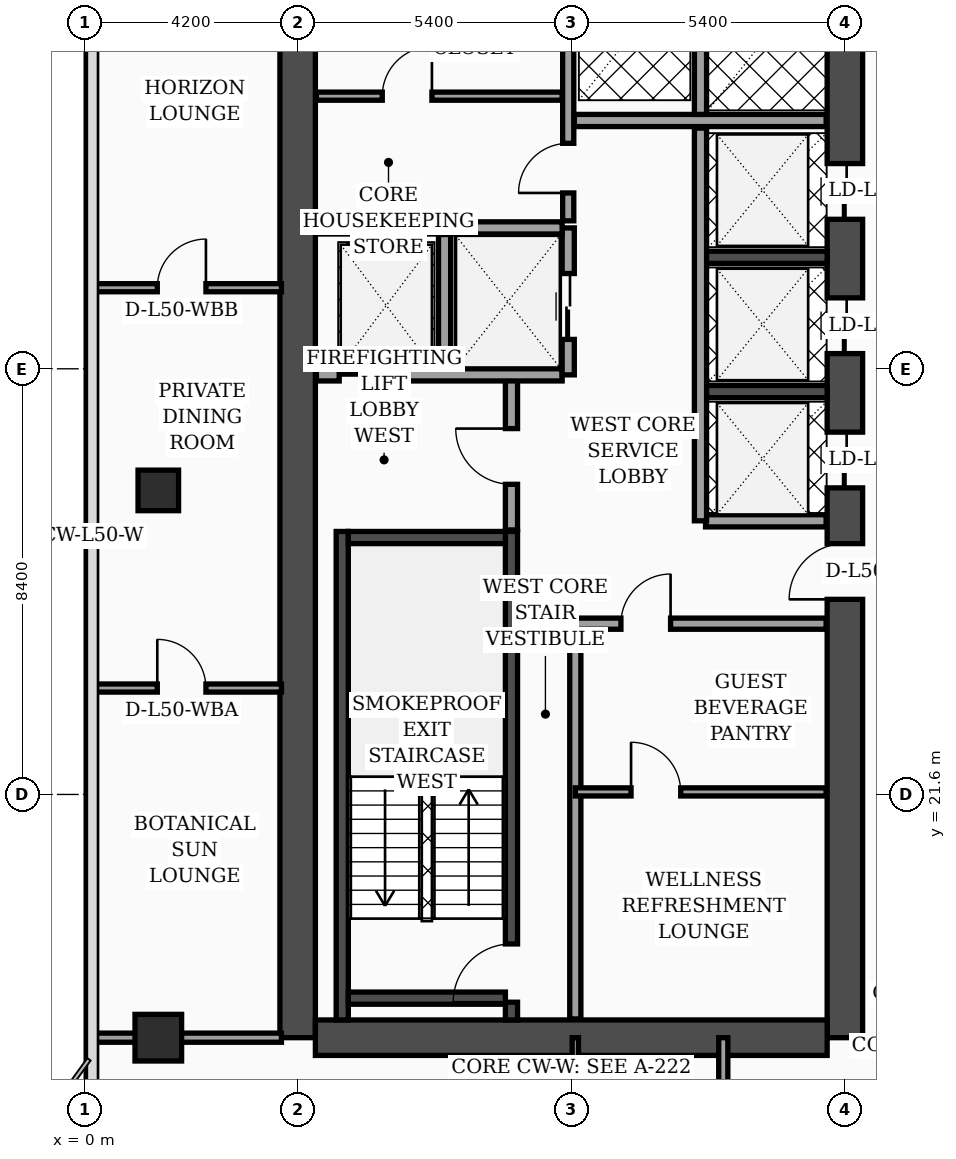
"""IFC4 building model, lengths in metres.
Left out: names, types, materials, properties, quantities, classifications, styles, units other than length and angle.
Written with IfcOpenShell. Run it as: python <this file> out.ifc"""

import sys

from ifc_helpers import new_model, si_unit, direction, frame, frame_2d, origin, origin_2d, place, context, subcontext, project, spatial, rectangle, extrude, element, fill, save


model = new_model("IFC4")
c1 = context("Model", 3, precision=1e-05, world=origin(), true_north=direction((0.0, 1.0)))
c2 = subcontext(c1, "Body", "Model", "MODEL_VIEW")
j1 = project(units=[si_unit("LENGTHUNIT", "METRE"), si_unit("PLANEANGLEUNIT", "RADIAN")], contexts=[c1])
p1 = place(None, origin())
s1 = spatial("IfcSite", under=j1, at=p1, CompositionType="ELEMENT")
p2 = place(p1, origin())
s2 = spatial("IfcBuilding", under=s1, at=p2, CompositionType="ELEMENT")
p3 = place(p2, frame((0.0, 0.0, 203.4)))
s3 = spatial("IfcBuildingStorey", under=s2, at=p3, CompositionType="ELEMENT", Elevation=203.4)
p4 = place(p3, frame((4.2, 16.8, 0.0), z_axis=(0.0, 0.0, 1.0), x_axis=(0.0, 1.0, 0.0)))
e1 = element("IfcWall", 1, at=p4, inside=s3, PredefinedType="SHEAR", context=c2, shape_type="SweptSolid", body=[
    extrude(rectangle(XDim=21.6, YDim=0.7, at=frame_2d((10.8, 0.0))), origin(), (0.0, 0.0, 1.0), 3.56),
])
p5 = place(p3, frame((15.0, 16.8, 0.0), z_axis=(0.0, 0.0, 1.0), x_axis=(0.0, 1.0, 0.0)))
e2 = element("IfcWall", 2, at=p5, inside=s3, PredefinedType="SHEAR", context=c2, shape_type="SweptSolid", body=[
    extrude(rectangle(XDim=21.6, YDim=0.7, at=frame_2d((10.8, 0.0))), origin(), (0.0, 0.0, 1.0), 3.56),
])
p6 = place(p5, frame((8.65, 0.0, 0.0)))
e3 = element("IfcOpeningElement", 3, at=p6, cuts=e2, PredefinedType="OPENING", context=c2, shape_type="SweptSolid", body=[
    extrude(rectangle(XDim=1.1, YDim=2.2, at=frame_2d((0.55, 1.1))), frame((0.0, 0.36, 0.0), z_axis=(0.0, -1.0, 0.0), x_axis=(1.0, 0.0, 0.0)), (0.0, 0.0, 1.0), 0.72),
])
p7 = place(p5, frame((10.85, 0.0, 0.0)))
e4 = element("IfcOpeningElement", 4, at=p7, cuts=e2, PredefinedType="OPENING", context=c2, shape_type="SweptSolid", body=[
    extrude(rectangle(XDim=1.1, YDim=2.2, at=frame_2d((0.55, 1.1))), frame((0.0, 0.36, 0.0), z_axis=(0.0, -1.0, 0.0), x_axis=(1.0, 0.0, 0.0)), (0.0, 0.0, 1.0), 0.72),
])
p8 = place(p5, frame((13.5, 0.0, 0.0)))
e5 = element("IfcOpeningElement", 5, at=p8, cuts=e2, PredefinedType="OPENING", context=c2, shape_type="SweptSolid", body=[
    extrude(rectangle(XDim=1.1, YDim=2.2, at=frame_2d((0.55, 1.1))), frame((0.0, 0.36, 0.0), z_axis=(0.0, -1.0, 0.0), x_axis=(1.0, 0.0, 0.0)), (0.0, 0.0, 1.0), 0.72),
])
p9 = place(p5, frame((16.15, 0.0, 0.0)))
e6 = element("IfcOpeningElement", 6, at=p9, cuts=e2, PredefinedType="OPENING", context=c2, shape_type="SweptSolid", body=[
    extrude(rectangle(XDim=1.1, YDim=2.2, at=frame_2d((0.55, 1.1))), frame((0.0, 0.36, 0.0), z_axis=(0.0, -1.0, 0.0), x_axis=(1.0, 0.0, 0.0)), (0.0, 0.0, 1.0), 0.72),
])
p10 = place(p3, frame((4.55, 16.8, 0.0), z_axis=(0.0, 0.0, 1.0), x_axis=(1.0, 0.0, 0.0)))
e7 = element("IfcWall", 7, at=p10, inside=s3, PredefinedType="SHEAR", context=c2, shape_type="SweptSolid", body=[
    extrude(rectangle(XDim=10.1, YDim=0.7, at=frame_2d((5.05, 0.0))), origin(), (0.0, 0.0, 1.0), 3.56),
])
p11 = place(p3, frame((5.08, 17.15, 0.0), z_axis=(0.0, 0.0, 1.0), x_axis=(0.0, 1.0, 0.0)))
e8 = element("IfcWall", 8, at=p11, inside=s3, PredefinedType="SOLIDWALL", context=c2, shape_type="SweptSolid", body=[
    extrude(rectangle(XDim=9.64, YDim=0.24, at=frame_2d((4.82, 0.0))), origin(), (0.0, 0.0, 1.0), 3.56),
])
p12 = place(p3, frame((8.42, 17.15, 0.0), z_axis=(0.0, 0.0, 1.0), x_axis=(0.0, 1.0, 0.0)))
e9 = element("IfcWall", 9, at=p12, inside=s3, PredefinedType="SOLIDWALL", context=c2, shape_type="SweptSolid", body=[
    extrude(rectangle(XDim=9.64, YDim=0.24, at=frame_2d((4.82, 0.0))), origin(), (0.0, 0.0, 1.0), 3.56),
])
p13 = place(p12, frame((0.35, 0.0, 0.0)))
e10 = element("IfcOpeningElement", 10, at=p13, cuts=e9, PredefinedType="OPENING", context=c2, shape_type="SweptSolid", body=[
    extrude(rectangle(XDim=1.15, YDim=2.2, at=frame_2d((0.575, 1.1))), frame((0.0, 0.13, 0.0), z_axis=(0.0, -1.0, 0.0), x_axis=(1.0, 0.0, 0.0)), (0.0, 0.0, 1.0), 0.26),
])
for number, where, z_axis, x_axis in (
    (11, (5.2, 17.58, 0.0), (0.0, 0.0, 1.0), (1.0, 0.0, 0.0)),
    (12, (5.2, 26.67, 0.0), (0.0, 0.0, 1.0), (1.0, 0.0, 0.0)),
):
    element("IfcWall", number, at=place(p3, frame(where, z_axis=z_axis, x_axis=x_axis)), inside=s3, PredefinedType="SOLIDWALL", context=c2, shape_type="SweptSolid", body=[
        extrude(rectangle(XDim=3.1, YDim=0.24, at=frame_2d((1.55, 0.0))), origin(), (0.0, 0.0, 1.0), 3.56),
    ])
for number, where, z_axis, x_axis in (
    (13, (12.18, 29.55, 0.0), (0.0, 0.0, 1.0), (1.0, 0.0, 0.0)),
    (14, (12.18, 32.2, 0.0), (0.0, 0.0, 1.0), (1.0, 0.0, 0.0)),
):
    element("IfcWall", number, at=place(p3, frame(where, z_axis=z_axis, x_axis=x_axis)), inside=s3, PredefinedType="SOLIDWALL", context=c2, shape_type="SweptSolid", body=[
        extrude(rectangle(XDim=2.47, YDim=0.24, at=frame_2d((1.235, 0.0))), origin(), (0.0, 0.0, 1.0), 3.56),
    ])
p14 = place(p3, frame((1.45, 16.8, 0.0), z_axis=(0.0, 0.0, 1.0), x_axis=(1.0, 0.0, 0.0)))
e15 = element("IfcColumn", 15, at=p14, inside=s3, PredefinedType="COLUMN", context=c2, shape_type="SweptSolid", body=[
    extrude(rectangle(XDim=0.92, YDim=0.92, at=origin_2d()), origin(), (0.0, 0.0, 1.0), 3.56),
])
p15 = place(p3, frame((1.45, 27.6, 0.0), z_axis=(0.0, 0.0, 1.0), x_axis=(1.0, 0.0, 0.0)))
e16 = element("IfcColumn", 16, at=p15, inside=s3, PredefinedType="COLUMN", context=c2, shape_type="SweptSolid", body=[
    extrude(rectangle(XDim=0.8, YDim=0.8, at=origin_2d()), origin(), (0.0, 0.0, 1.0), 3.56),
])
p16 = place(p3, frame((8.42, 26.82, 0.0), z_axis=(0.0, 0.0, 1.0), x_axis=(0.0, 1.0, 0.0)))
e17 = element("IfcWall", 17, at=p16, inside=s3, PredefinedType="SOLIDWALL", context=c2, shape_type="SweptSolid", body=[
    extrude(rectangle(XDim=3.0, YDim=0.24, at=frame_2d((1.5, 0.0))), origin(), (0.0, 0.0, 1.0), 3.56),
])
p17 = place(p16, frame((0.9, 0.0, 0.0)))
e18 = element("IfcOpeningElement", 18, at=p17, cuts=e17, PredefinedType="OPENING", context=c2, shape_type="SweptSolid", body=[
    extrude(rectangle(XDim=1.1, YDim=2.2, at=frame_2d((0.55, 1.1))), frame((0.0, 0.13, 0.0), z_axis=(0.0, -1.0, 0.0), x_axis=(1.0, 0.0, 0.0)), (0.0, 0.0, 1.0), 0.26),
])
p18 = place(p3, frame((4.57, 29.88, 0.0), z_axis=(0.0, 0.0, 1.0), x_axis=(1.0, 0.0, 0.0)))
e19 = element("IfcWall", 19, at=p18, inside=s3, PredefinedType="SOLIDWALL", context=c2, shape_type="SweptSolid", body=[
    extrude(rectangle(XDim=4.85, YDim=0.24, at=frame_2d((2.425, 0.0))), origin(), (0.0, 0.0, 1.0), 3.56),
])
p19 = place(p18, frame((0.45, 0.0, 0.0)))
e20 = element("IfcOpeningElement", 20, at=p19, cuts=e19, PredefinedType="OPENING", context=c2, shape_type="SweptSolid", body=[
    extrude(rectangle(XDim=1.3, YDim=2.35, at=frame_2d((0.65, 1.175))), frame((0.0, 0.13, 0.0), z_axis=(0.0, -1.0, 0.0), x_axis=(1.0, 0.0, 0.0)), (0.0, 0.0, 1.0), 0.26),
])
p20 = place(p3, frame((7.1, 30.02, 0.0), z_axis=(0.0, 0.0, 1.0), x_axis=(0.0, 1.0, 0.0)))
e21 = element("IfcWall", 21, at=p20, inside=s3, PredefinedType="SOLIDWALL", context=c2, shape_type="SweptSolid", body=[
    extrude(rectangle(XDim=2.63, YDim=0.24, at=frame_2d((1.315, 0.0))), origin(), (0.0, 0.0, 1.0), 3.56),
])
p21 = place(p3, frame((9.54, 29.88, 0.0), z_axis=(0.0, 0.0, 1.0), x_axis=(0.0, 1.0, 0.0)))
e22 = element("IfcWall", 22, at=p21, inside=s3, PredefinedType="SOLIDWALL", context=c2, shape_type="SweptSolid", body=[
    extrude(rectangle(XDim=2.9, YDim=0.24, at=frame_2d((1.45, 0.0))), origin(), (0.0, 0.0, 1.0), 3.56),
])
p22 = place(p21, frame((0.7, 0.0, 0.0)))
e23 = element("IfcOpeningElement", 23, at=p22, cuts=e22, PredefinedType="OPENING", context=c2, shape_type="SweptSolid", body=[
    extrude(rectangle(XDim=1.3, YDim=2.35, at=frame_2d((0.65, 1.175))), frame((0.0, 0.13, 0.0), z_axis=(0.0, -1.0, 0.0), x_axis=(1.0, 0.0, 0.0)), (0.0, 0.0, 1.0), 0.26),
])
p23 = place(p3, frame((4.57, 32.78, 0.0), z_axis=(0.0, 0.0, 1.0), x_axis=(1.0, 0.0, 0.0)))
e24 = element("IfcWall", 24, at=p23, inside=s3, PredefinedType="SOLIDWALL", context=c2, shape_type="SweptSolid", body=[
    extrude(rectangle(XDim=4.85, YDim=0.24, at=frame_2d((2.425, 0.0))), origin(), (0.0, 0.0, 1.0), 3.19),
])
p24 = place(p3, frame((9.68, 17.17, 0.0), z_axis=(0.0, 0.0, 1.0), x_axis=(0.0, 1.0, 0.0)))
e25 = element("IfcWall", 25, at=p24, inside=s3, PredefinedType="SOLIDWALL", context=c2, shape_type="SweptSolid", body=[
    extrude(rectangle(XDim=7.83, YDim=0.22, at=frame_2d((3.915, 0.0))), origin(), (0.0, 0.0, 1.0), 3.56),
])
p25 = place(p3, frame((4.57, 35.38, 0.0), z_axis=(0.0, 0.0, 1.0), x_axis=(1.0, 0.0, 0.0)))
e26 = element("IfcWall", 26, at=p25, inside=s3, PredefinedType="PARTITIONING", context=c2, shape_type="SweptSolid", body=[
    extrude(rectangle(XDim=4.85, YDim=0.16, at=frame_2d((2.425, 0.0))), origin(), (0.0, 0.0, 1.0), 3.56),
])
p26 = place(p25, frame((1.3, 0.0, 0.0)))
e27 = element("IfcOpeningElement", 27, at=p26, cuts=e26, PredefinedType="OPENING", context=c2, shape_type="SweptSolid", body=[
    extrude(rectangle(XDim=0.98, YDim=2.15, at=frame_2d((0.49, 1.075))), frame((0.0, 0.09, 0.0), z_axis=(0.0, -1.0, 0.0), x_axis=(1.0, 0.0, 0.0)), (0.0, 0.0, 1.0), 0.18),
])
p27 = place(p3, frame((9.54, 32.92, 0.0), z_axis=(0.0, 0.0, 1.0), x_axis=(0.0, 1.0, 0.0)))
e28 = element("IfcWall", 28, at=p27, inside=s3, PredefinedType="SOLIDWALL", context=c2, shape_type="SweptSolid", body=[
    extrude(rectangle(XDim=5.11, YDim=0.22, at=frame_2d((2.555, 0.0))), origin(), (0.0, 0.0, 1.0), 3.56),
])
p28 = place(p27, frame((0.55, 0.0, 0.0)))
e29 = element("IfcOpeningElement", 29, at=p28, cuts=e28, PredefinedType="OPENING", context=c2, shape_type="SweptSolid", body=[
    extrude(rectangle(XDim=0.98, YDim=2.15, at=frame_2d((0.49, 1.075))), frame((0.0, 0.12, 0.0), z_axis=(0.0, -1.0, 0.0), x_axis=(1.0, 0.0, 0.0)), (0.0, 0.0, 1.0), 0.24),
])
p29 = place(p3, frame((9.68, 21.65, 0.0), z_axis=(0.0, 0.0, 1.0), x_axis=(1.0, 0.0, 0.0)))
e30 = element("IfcWall", 30, at=p29, inside=s3, PredefinedType="PARTITIONING", context=c2, shape_type="SweptSolid", body=[
    extrude(rectangle(XDim=4.95, YDim=0.16, at=frame_2d((2.475, 0.0))), origin(), (0.0, 0.0, 1.0), 3.09),
])
p30 = place(p29, frame((1.1, 0.0, 0.0)))
e31 = element("IfcOpeningElement", 31, at=p30, cuts=e30, PredefinedType="OPENING", context=c2, shape_type="SweptSolid", body=[
    extrude(rectangle(XDim=0.98, YDim=2.15, at=frame_2d((0.49, 1.075))), frame((0.0, 0.09, 0.0), z_axis=(0.0, -1.0, 0.0), x_axis=(1.0, 0.0, 0.0)), (0.0, 0.0, 1.0), 0.18),
])
p31 = place(p3, frame((9.68, 24.97, 0.0), z_axis=(0.0, 0.0, 1.0), x_axis=(1.0, 0.0, 0.0)))
e32 = element("IfcWall", 32, at=p31, inside=s3, PredefinedType="SOLIDWALL", context=c2, shape_type="SweptSolid", body=[
    extrude(rectangle(XDim=4.95, YDim=0.22, at=frame_2d((2.475, 0.0))), origin(), (0.0, 0.0, 1.0), 2.94),
])
p32 = place(p31, frame((0.9, 0.0, 0.0)))
e33 = element("IfcOpeningElement", 33, at=p32, cuts=e32, PredefinedType="OPENING", context=c2, shape_type="SweptSolid", body=[
    extrude(rectangle(XDim=0.98, YDim=2.15, at=frame_2d((0.49, 1.075))), frame((0.0, 0.12, 0.0), z_axis=(0.0, -1.0, 0.0), x_axis=(1.0, 0.0, 0.0)), (0.0, 0.0, 1.0), 0.24),
])
p33 = place(p3, frame((12.25, 27.0, 0.0), z_axis=(0.0, 0.0, 1.0), x_axis=(1.0, 0.0, 0.0)))
e34 = element("IfcWall", 34, at=p33, inside=s3, PredefinedType="SOLIDWALL", context=c2, shape_type="SweptSolid", body=[
    extrude(rectangle(XDim=2.38, YDim=0.24, at=frame_2d((1.19, 0.0))), origin(), (0.0, 0.0, 1.0), 3.56),
])
p34 = place(p3, frame((12.15, 27.0, 0.0), z_axis=(0.0, 0.0, 1.0), x_axis=(0.0, 1.0, 0.0)))
e35 = element("IfcWall", 35, at=p34, inside=s3, PredefinedType="SOLIDWALL", context=c2, shape_type="SweptSolid", body=[
    extrude(rectangle(XDim=7.75, YDim=0.24, at=frame_2d((3.875, 0.0))), origin(), (0.0, 0.0, 1.0), 3.56),
])
p35 = place(p3, frame((9.66, 34.9, 0.0), z_axis=(0.0, 0.0, 1.0), x_axis=(1.0, 0.0, 0.0)))
e36 = element("IfcWall", 36, at=p35, inside=s3, PredefinedType="SOLIDWALL", context=c2, shape_type="SweptSolid", body=[
    extrude(rectangle(XDim=4.97, YDim=0.24, at=frame_2d((2.485, 0.0))), origin(), (0.0, 0.0, 1.0), 3.56),
])
p36 = place(p3, frame((12.15, 35.02, 0.0), z_axis=(0.0, 0.0, 1.0), x_axis=(0.0, 1.0, 0.0)))
e37 = element("IfcWall", 37, at=p36, inside=s3, PredefinedType="SOLIDWALL", context=c2, shape_type="SweptSolid", body=[
    extrude(rectangle(XDim=3.01, YDim=0.24, at=frame_2d((1.505, 0.0))), origin(), (0.0, 0.0, 1.0), 3.56),
])
p37 = place(p3, frame((0.08, 23.7, 0.0), z_axis=(0.0, 0.0, 1.0), x_axis=(1.0, 0.0, 0.0)))
e38 = element("IfcWall", 38, at=p37, inside=s3, PredefinedType="PARTITIONING", context=c2, shape_type="SweptSolid", body=[
    extrude(rectangle(XDim=3.8, YDim=0.16, at=frame_2d((1.9, 0.0))), origin(), (0.0, 0.0, 1.0), 3.09),
])
p38 = place(p37, frame((1.35, 0.0, 0.0)))
e39 = element("IfcOpeningElement", 39, at=p38, cuts=e38, PredefinedType="OPENING", context=c2, shape_type="SweptSolid", body=[
    extrude(rectangle(XDim=0.96, YDim=2.2, at=frame_2d((0.48, 1.1))), frame((0.0, 0.09, 0.0), z_axis=(0.0, -1.0, 0.0), x_axis=(1.0, 0.0, 0.0)), (0.0, 0.0, 1.0), 0.18),
])
p39 = place(p3, frame((0.08, 31.6, 0.0), z_axis=(0.0, 0.0, 1.0), x_axis=(1.0, 0.0, 0.0)))
e40 = element("IfcWall", 40, at=p39, inside=s3, PredefinedType="PARTITIONING", context=c2, shape_type="SweptSolid", body=[
    extrude(rectangle(XDim=3.8, YDim=0.16, at=frame_2d((1.9, 0.0))), origin(), (0.0, 0.0, 1.0), 3.09),
])
p40 = place(p39, frame((1.35, 0.0, 0.0)))
e41 = element("IfcOpeningElement", 41, at=p40, cuts=e40, PredefinedType="OPENING", context=c2, shape_type="SweptSolid", body=[
    extrude(rectangle(XDim=0.96, YDim=2.2, at=frame_2d((0.48, 1.1))), frame((0.0, 0.09, 0.0), z_axis=(0.0, -1.0, 0.0), x_axis=(1.0, 0.0, 0.0)), (0.0, 0.0, 1.0), 0.18),
])
p41 = place(p3, frame((0.08, 16.8, 0.0), z_axis=(0.0, 0.0, 1.0), x_axis=(1.0, 0.0, 0.0)))
e42 = element("IfcWall", 42, at=p41, inside=s3, PredefinedType="PARTITIONING", context=c2, shape_type="SweptSolid", body=[
    extrude(rectangle(XDim=3.8, YDim=0.18, at=frame_2d((1.9, 0.0))), origin(), (0.0, 0.0, 1.0), 2.94),
])
p42 = place(p3, frame((9.68, 14.75, 0.0), z_axis=(0.0, 0.0, 1.0), x_axis=(0.0, 1.0, 0.0)))
e43 = element("IfcWall", 43, at=p42, inside=s3, PredefinedType="PARTITIONING", context=c2, shape_type="SweptSolid", body=[
    extrude(rectangle(XDim=2.05, YDim=0.125, at=frame_2d((1.025, 0.0))), origin(), (0.0, 0.0, 1.0), 3.56),
])
p43 = place(p3, frame((12.6, 2.44, 0.0), z_axis=(0.0, 0.0, 1.0), x_axis=(0.0, 1.0, 0.0)))
e44 = element("IfcWall", 44, at=p43, inside=s3, PredefinedType="PARTITIONING", context=c2, shape_type="SweptSolid", body=[
    extrude(rectangle(XDim=14.36, YDim=0.18, at=frame_2d((7.18, 0.0))), origin(), (0.0, 0.0, 1.0), 2.94),
])
p44 = place(p43, frame((3.01, 0.0, 0.0)))
e45 = element("IfcOpeningElement", 45, at=p44, cuts=e44, PredefinedType="OPENING", context=c2, shape_type="SweptSolid", body=[
    extrude(rectangle(XDim=1.02, YDim=2.2, at=frame_2d((0.51, 1.1))), frame((0.0, 0.1, 0.0), z_axis=(0.0, -1.0, 0.0), x_axis=(1.0, 0.0, 0.0)), (0.0, 0.0, 1.0), 0.2),
])
p45 = place(p43, frame((9.52, 0.0, 0.0)))
e46 = element("IfcOpeningElement", 46, at=p45, cuts=e44, PredefinedType="OPENING", context=c2, shape_type="SweptSolid", body=[
    extrude(rectangle(XDim=1.02, YDim=2.2, at=frame_2d((0.51, 1.1))), frame((0.0, 0.1, 0.0), z_axis=(0.0, -1.0, 0.0), x_axis=(1.0, 0.0, 0.0)), (0.0, 0.0, 1.0), 0.2),
])
p46 = place(p17, origin())
e47 = element("IfcDoor", 47, at=p46, inside=s3, OperationType="SINGLE_SWING_RIGHT", PredefinedType="DOOR", context=c2, shape_type="SweptSolid", body=[
    extrude(rectangle(XDim=1.1, YDim=2.2, at=frame_2d((0.55, 1.1))), frame((0.0, 0.025, 0.0), z_axis=(0.0, -1.0, 0.0), x_axis=(1.0, 0.0, 0.0)), (0.0, 0.0, 1.0), 0.05),
])
fill(e18, e47)
p47 = place(p19, origin())
e48 = element("IfcDoor", 48, at=p47, inside=s3, OperationType="DOUBLE_DOOR_SLIDING", PredefinedType="DOOR", context=c2, shape_type="SweptSolid", body=[
    extrude(rectangle(XDim=1.3, YDim=2.35, at=frame_2d((0.65, 1.175))), frame((0.0, 0.025, 0.0), z_axis=(0.0, -1.0, 0.0), x_axis=(1.0, 0.0, 0.0)), (0.0, 0.0, 1.0), 0.05),
])
fill(e20, e48)
p48 = place(p22, origin())
e49 = element("IfcDoor", 49, at=p48, inside=s3, OperationType="DOUBLE_DOOR_SLIDING", PredefinedType="DOOR", context=c2, shape_type="SweptSolid", body=[
    extrude(rectangle(XDim=1.3, YDim=2.35, at=frame_2d((0.65, 1.175))), frame((0.0, 0.025, 0.0), z_axis=(0.0, -1.0, 0.0), x_axis=(1.0, 0.0, 0.0)), (0.0, 0.0, 1.0), 0.05),
])
fill(e23, e49)
p49 = place(p26, origin())
e50 = element("IfcDoor", 50, at=p49, inside=s3, OperationType="SINGLE_SWING_RIGHT", PredefinedType="DOOR", context=c2, shape_type="SweptSolid", body=[
    extrude(rectangle(XDim=0.98, YDim=2.15, at=frame_2d((0.49, 1.075))), frame((0.0, 0.025, 0.0), z_axis=(0.0, -1.0, 0.0), x_axis=(1.0, 0.0, 0.0)), (0.0, 0.0, 1.0), 0.05),
])
fill(e27, e50)
p50 = place(p28, origin())
e51 = element("IfcDoor", 51, at=p50, inside=s3, OperationType="SINGLE_SWING_LEFT", PredefinedType="DOOR", context=c2, shape_type="SweptSolid", body=[
    extrude(rectangle(XDim=0.98, YDim=2.15, at=frame_2d((0.49, 1.075))), frame((0.0, 0.025, 0.0), z_axis=(0.0, -1.0, 0.0), x_axis=(1.0, 0.0, 0.0)), (0.0, 0.0, 1.0), 0.05),
])
fill(e29, e51)
p51 = place(p30, origin())
e52 = element("IfcDoor", 52, at=p51, inside=s3, OperationType="SINGLE_SWING_LEFT", PredefinedType="DOOR", context=c2, shape_type="SweptSolid", body=[
    extrude(rectangle(XDim=0.98, YDim=2.15, at=frame_2d((0.49, 1.075))), frame((0.0, 0.025, 0.0), z_axis=(0.0, -1.0, 0.0), x_axis=(1.0, 0.0, 0.0)), (0.0, 0.0, 1.0), 0.05),
])
fill(e31, e52)
p52 = place(p32, origin())
e53 = element("IfcDoor", 53, at=p52, inside=s3, OperationType="SINGLE_SWING_RIGHT", PredefinedType="DOOR", context=c2, shape_type="SweptSolid", body=[
    extrude(rectangle(XDim=0.98, YDim=2.15, at=frame_2d((0.49, 1.075))), frame((0.0, 0.025, 0.0), z_axis=(0.0, -1.0, 0.0), x_axis=(1.0, 0.0, 0.0)), (0.0, 0.0, 1.0), 0.05),
])
fill(e33, e53)
p53 = place(p38, origin())
e54 = element("IfcDoor", 54, at=p53, inside=s3, OperationType="SINGLE_SWING_LEFT", PredefinedType="DOOR", context=c2, shape_type="SweptSolid", body=[
    extrude(rectangle(XDim=0.96, YDim=2.2, at=frame_2d((0.48, 1.1))), frame((0.0, 0.025, 0.0), z_axis=(0.0, -1.0, 0.0), x_axis=(1.0, 0.0, 0.0)), (0.0, 0.0, 1.0), 0.05),
])
fill(e39, e54)
p54 = place(p40, origin())
e55 = element("IfcDoor", 55, at=p54, inside=s3, OperationType="SINGLE_SWING_RIGHT", PredefinedType="DOOR", context=c2, shape_type="SweptSolid", body=[
    extrude(rectangle(XDim=0.96, YDim=2.2, at=frame_2d((0.48, 1.1))), frame((0.0, 0.025, 0.0), z_axis=(0.0, -1.0, 0.0), x_axis=(1.0, 0.0, 0.0)), (0.0, 0.0, 1.0), 0.05),
])
fill(e41, e55)
p55 = place(p13, origin())
e56 = element("IfcDoor", 56, at=p55, inside=s3, OperationType="SINGLE_SWING_LEFT", PredefinedType="DOOR", context=c2, shape_type="SweptSolid", body=[
    extrude(rectangle(XDim=1.15, YDim=2.2, at=frame_2d((0.575, 1.1))), frame((0.0, 0.025, 0.0), z_axis=(0.0, -1.0, 0.0), x_axis=(1.0, 0.0, 0.0)), (0.0, 0.0, 1.0), 0.05),
])
fill(e10, e56)
p56 = place(p6, origin())
e57 = element("IfcDoor", 57, at=p56, inside=s3, OperationType="SINGLE_SWING_LEFT", PredefinedType="DOOR", context=c2, shape_type="SweptSolid", body=[
    extrude(rectangle(XDim=1.1, YDim=2.2, at=frame_2d((0.55, 1.1))), frame((0.0, 0.025, 0.0), z_axis=(0.0, -1.0, 0.0), x_axis=(1.0, 0.0, 0.0)), (0.0, 0.0, 1.0), 0.05),
])
fill(e3, e57)
p57 = place(p7, origin())
e58 = element("IfcDoor", 58, at=p57, inside=s3, OperationType="DOUBLE_DOOR_SLIDING", PredefinedType="DOOR", context=c2, shape_type="SweptSolid", body=[
    extrude(rectangle(XDim=1.1, YDim=2.2, at=frame_2d((0.55, 1.1))), frame((0.0, 0.025, 0.0), z_axis=(0.0, -1.0, 0.0), x_axis=(1.0, 0.0, 0.0)), (0.0, 0.0, 1.0), 0.05),
])
fill(e4, e58)
p58 = place(p8, origin())
e59 = element("IfcDoor", 59, at=p58, inside=s3, OperationType="DOUBLE_DOOR_SLIDING", PredefinedType="DOOR", context=c2, shape_type="SweptSolid", body=[
    extrude(rectangle(XDim=1.1, YDim=2.2, at=frame_2d((0.55, 1.1))), frame((0.0, 0.025, 0.0), z_axis=(0.0, -1.0, 0.0), x_axis=(1.0, 0.0, 0.0)), (0.0, 0.0, 1.0), 0.05),
])
fill(e5, e59)
p59 = place(p9, origin())
e60 = element("IfcDoor", 60, at=p59, inside=s3, OperationType="DOUBLE_DOOR_SLIDING", PredefinedType="DOOR", context=c2, shape_type="SweptSolid", body=[
    extrude(rectangle(XDim=1.1, YDim=2.2, at=frame_2d((0.55, 1.1))), frame((0.0, 0.025, 0.0), z_axis=(0.0, -1.0, 0.0), x_axis=(1.0, 0.0, 0.0)), (0.0, 0.0, 1.0), 0.05),
])
fill(e6, e60)
save(model, sys.argv[1])
